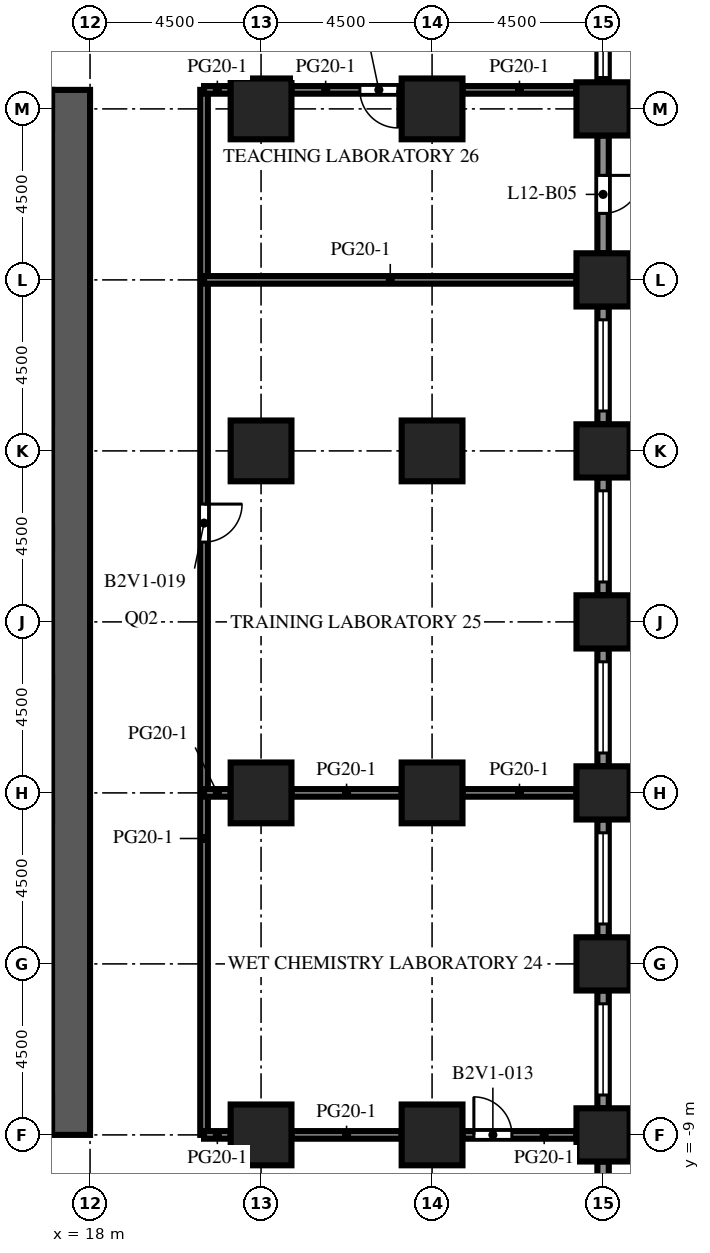
"""IFC4 building model, lengths in metres.
Left out: names, types, materials, properties, quantities, classifications, styles, units other than length and angle.
Written with IfcOpenShell. Run it as: python <this file> out.ifc"""

import sys

from ifc_helpers import new_model, si_unit, direction, frame, frame_2d, origin, origin_2d, place, context, subcontext, project, spatial, rectangle, extrude, element, fill, save


model = new_model("IFC4")
c1 = context("Model", 3, precision=1e-05, world=origin(), true_north=direction((0.0, 1.0)))
c2 = subcontext(c1, "Body", "Model", "MODEL_VIEW")
j1 = project(units=[si_unit("LENGTHUNIT", "METRE"), si_unit("PLANEANGLEUNIT", "RADIAN")], contexts=[c1])
p1 = place(None, origin())
s1 = spatial("IfcSite", under=j1, at=p1, CompositionType="ELEMENT")
p2 = place(p1, origin())
s2 = spatial("IfcBuilding", under=s1, at=p2, CompositionType="ELEMENT")
p3 = place(p2, frame((0.0, 0.0, 54.2)))
s3 = spatial("IfcBuildingStorey", under=s2, at=p3, CompositionType="ELEMENT", Elevation=54.2)
for number, where, z_axis, x_axis in (
    (1, (31.5, -9.0, 0.0), (0.0, 0.0, 1.0), (1.0, 0.0, 0.0)),
    (2, (31.5, -4.5, 0.0), (0.0, 0.0, 1.0), (1.0, 0.0, 0.0)),
    (3, (31.5, 0.0, 0.0), (0.0, 0.0, 1.0), (1.0, 0.0, 0.0)),
    (4, (31.5, 4.5, 0.0), (0.0, 0.0, 1.0), (1.0, 0.0, 0.0)),
    (5, (31.5, 9.0, 0.0), (0.0, 0.0, 1.0), (1.0, 0.0, 0.0)),
    (6, (31.5, 13.5, 0.0), (0.0, 0.0, 1.0), (1.0, 0.0, 0.0)),
    (7, (31.5, 18.0, 0.0), (0.0, 0.0, 1.0), (1.0, 0.0, 0.0)),
):
    element("IfcColumn", number, at=place(p3, frame(where, z_axis=z_axis, x_axis=x_axis)), inside=s3, PredefinedType="COLUMN", context=c2, shape_type="SweptSolid", body=[
        extrude(rectangle(XDim=1.4, YDim=1.4, at=origin_2d()), origin(), (0.0, 0.0, 1.0), 4.1),
    ])
for number, where, z_axis, x_axis in (
    (8, (22.5, -9.0, 0.0), (0.0, 0.0, 1.0), (1.0, 0.0, 0.0)),
    (9, (22.5, 0.0, 0.0), (0.0, 0.0, 1.0), (1.0, 0.0, 0.0)),
    (10, (22.5, 9.0, 0.0), (0.0, 0.0, 1.0), (1.0, 0.0, 0.0)),
    (11, (22.5, 18.0, 0.0), (0.0, 0.0, 1.0), (1.0, 0.0, 0.0)),
    (12, (27.0, -9.0, 0.0), (0.0, 0.0, 1.0), (1.0, 0.0, 0.0)),
    (13, (27.0, 0.0, 0.0), (0.0, 0.0, 1.0), (1.0, 0.0, 0.0)),
    (14, (27.0, 9.0, 0.0), (0.0, 0.0, 1.0), (1.0, 0.0, 0.0)),
    (15, (27.0, 18.0, 0.0), (0.0, 0.0, 1.0), (1.0, 0.0, 0.0)),
):
    element("IfcColumn", number, at=place(p3, frame(where, z_axis=z_axis, x_axis=x_axis)), inside=s3, PredefinedType="COLUMN", context=c2, shape_type="SweptSolid", body=[
        extrude(rectangle(XDim=1.6, YDim=1.6, at=origin_2d()), origin(), (0.0, 0.0, 1.0), 4.1),
    ])
p4 = place(p3, frame((17.5, -9.0, 0.0), z_axis=(0.0, 0.0, 1.0), x_axis=(0.0, 1.0, 0.0)))
e16 = element("IfcWall", 16, at=p4, inside=s3, PredefinedType="SHEAR", context=c2, shape_type="SweptSolid", body=[
    extrude(rectangle(XDim=27.5, YDim=1.0, at=frame_2d((13.75, 0.0))), origin(), (0.0, 0.0, 1.0), 4.1),
])
p5 = place(p4, frame((12.55, 0.0, 0.0)))
e17 = element("IfcOpeningElement", 17, at=p5, cuts=e16, PredefinedType="OPENING", context=c2, shape_type="SweptSolid", body=[
    extrude(rectangle(XDim=2.4, YDim=2.4, at=frame_2d((1.2, 1.2))), frame((0.0, 0.51, 0.0), z_axis=(0.0, -1.0, 0.0), x_axis=(1.0, 0.0, 0.0)), (0.0, 0.0, 1.0), 1.02),
])
p6 = place(p4, frame((6.825, 0.0, 0.0)))
e18 = element("IfcOpeningElement", 18, at=p6, cuts=e16, PredefinedType="OPENING", context=c2, shape_type="SweptSolid", body=[
    extrude(rectangle(XDim=1.2, YDim=2.1, at=frame_2d((0.6, 1.05))), frame((0.0, 0.51, 0.0), z_axis=(0.0, -1.0, 0.0), x_axis=(1.0, 0.0, 0.0)), (0.0, 0.0, 1.0), 1.02),
])
p7 = place(p4, frame((19.475, 0.0, 0.0)))
e19 = element("IfcOpeningElement", 19, at=p7, cuts=e16, PredefinedType="OPENING", context=c2, shape_type="SweptSolid", body=[
    extrude(rectangle(XDim=1.2, YDim=2.1, at=frame_2d((0.6, 1.05))), frame((0.0, 0.51, 0.0), z_axis=(0.0, -1.0, 0.0), x_axis=(1.0, 0.0, 0.0)), (0.0, 0.0, 1.0), 1.02),
])
p8 = place(p3, frame((31.5, -9.7, 0.0), z_axis=(0.0, 0.0, 1.0), x_axis=(0.0, -1.0, 0.0)))
e20 = element("IfcWall", 20, at=p8, inside=s3, PredefinedType="SOLIDWALL", context=c2, shape_type="SweptSolid", body=[
    extrude(rectangle(XDim=3.1, YDim=0.3, at=frame_2d((1.55, 0.0))), origin(), (0.0, 0.0, 1.0), 2.75),
])
p9 = place(p8, frame((0.475, 0.0, 0.8)))
e21 = element("IfcOpeningElement", 21, at=p9, cuts=e20, PredefinedType="OPENING", context=c2, shape_type="SweptSolid", body=[
    extrude(rectangle(XDim=1.2, YDim=1.7, at=frame_2d((0.6, 0.85))), frame((0.0, 0.16, 0.0), z_axis=(0.0, -1.0, 0.0), x_axis=(1.0, 0.0, 0.0)), (0.0, 0.0, 1.0), 0.32),
])
p10 = place(p3, frame((31.5, -5.2, 0.0), z_axis=(0.0, 0.0, 1.0), x_axis=(0.0, -1.0, 0.0)))
e22 = element("IfcWall", 22, at=p10, inside=s3, PredefinedType="SOLIDWALL", context=c2, shape_type="SweptSolid", body=[
    extrude(rectangle(XDim=3.1, YDim=0.3, at=frame_2d((1.55, 0.0))), origin(), (0.0, 0.0, 1.0), 2.75),
])
p11 = place(p10, frame((0.35, 0.0, 0.8)))
e23 = element("IfcOpeningElement", 23, at=p11, cuts=e22, PredefinedType="OPENING", context=c2, shape_type="SweptSolid", body=[
    extrude(rectangle(XDim=2.4, YDim=1.7, at=frame_2d((1.2, 0.85))), frame((0.0, 0.16, 0.0), z_axis=(0.0, -1.0, 0.0), x_axis=(1.0, 0.0, 0.0)), (0.0, 0.0, 1.0), 0.32),
])
p12 = place(p3, frame((31.5, -0.7, 0.0), z_axis=(0.0, 0.0, 1.0), x_axis=(0.0, -1.0, 0.0)))
e24 = element("IfcWall", 24, at=p12, inside=s3, PredefinedType="SOLIDWALL", context=c2, shape_type="SweptSolid", body=[
    extrude(rectangle(XDim=3.1, YDim=0.3, at=frame_2d((1.55, 0.0))), origin(), (0.0, 0.0, 1.0), 2.75),
])
p13 = place(p12, frame((0.35, 0.0, 0.8)))
e25 = element("IfcOpeningElement", 25, at=p13, cuts=e24, PredefinedType="OPENING", context=c2, shape_type="SweptSolid", body=[
    extrude(rectangle(XDim=2.4, YDim=1.7, at=frame_2d((1.2, 0.85))), frame((0.0, 0.16, 0.0), z_axis=(0.0, -1.0, 0.0), x_axis=(1.0, 0.0, 0.0)), (0.0, 0.0, 1.0), 0.32),
])
p14 = place(p3, frame((31.5, 3.8, 0.0), z_axis=(0.0, 0.0, 1.0), x_axis=(0.0, -1.0, 0.0)))
e26 = element("IfcWall", 26, at=p14, inside=s3, PredefinedType="SOLIDWALL", context=c2, shape_type="SweptSolid", body=[
    extrude(rectangle(XDim=3.1, YDim=0.3, at=frame_2d((1.55, 0.0))), origin(), (0.0, 0.0, 1.0), 2.75),
])
p15 = place(p14, frame((0.35, 0.0, 0.8)))
e27 = element("IfcOpeningElement", 27, at=p15, cuts=e26, PredefinedType="OPENING", context=c2, shape_type="SweptSolid", body=[
    extrude(rectangle(XDim=2.4, YDim=1.7, at=frame_2d((1.2, 0.85))), frame((0.0, 0.16, 0.0), z_axis=(0.0, -1.0, 0.0), x_axis=(1.0, 0.0, 0.0)), (0.0, 0.0, 1.0), 0.32),
])
p16 = place(p3, frame((31.5, 8.3, 0.0), z_axis=(0.0, 0.0, 1.0), x_axis=(0.0, -1.0, 0.0)))
e28 = element("IfcWall", 28, at=p16, inside=s3, PredefinedType="SOLIDWALL", context=c2, shape_type="SweptSolid", body=[
    extrude(rectangle(XDim=3.1, YDim=0.3, at=frame_2d((1.55, 0.0))), origin(), (0.0, 0.0, 1.0), 2.75),
])
p17 = place(p16, frame((0.35, 0.0, 0.8)))
e29 = element("IfcOpeningElement", 29, at=p17, cuts=e28, PredefinedType="OPENING", context=c2, shape_type="SweptSolid", body=[
    extrude(rectangle(XDim=2.4, YDim=1.7, at=frame_2d((1.2, 0.85))), frame((0.0, 0.16, 0.0), z_axis=(0.0, -1.0, 0.0), x_axis=(1.0, 0.0, 0.0)), (0.0, 0.0, 1.0), 0.32),
])
p18 = place(p3, frame((31.5, 12.8, 0.0), z_axis=(0.0, 0.0, 1.0), x_axis=(0.0, -1.0, 0.0)))
e30 = element("IfcWall", 30, at=p18, inside=s3, PredefinedType="SOLIDWALL", context=c2, shape_type="SweptSolid", body=[
    extrude(rectangle(XDim=3.1, YDim=0.3, at=frame_2d((1.55, 0.0))), origin(), (0.0, 0.0, 1.0), 2.75),
])
p19 = place(p18, frame((0.35, 0.0, 0.8)))
e31 = element("IfcOpeningElement", 31, at=p19, cuts=e30, PredefinedType="OPENING", context=c2, shape_type="SweptSolid", body=[
    extrude(rectangle(XDim=2.4, YDim=1.7, at=frame_2d((1.2, 0.85))), frame((0.0, 0.16, 0.0), z_axis=(0.0, -1.0, 0.0), x_axis=(1.0, 0.0, 0.0)), (0.0, 0.0, 1.0), 0.32),
])
p20 = place(p3, frame((31.5, 17.3, 0.0), z_axis=(0.0, 0.0, 1.0), x_axis=(0.0, -1.0, 0.0)))
e32 = element("IfcWall", 32, at=p20, inside=s3, PredefinedType="SOLIDWALL", context=c2, shape_type="SweptSolid", body=[
    extrude(rectangle(XDim=3.1, YDim=0.3, at=frame_2d((1.55, 0.0))), origin(), (0.0, 0.0, 1.0), 2.75),
])
p21 = place(p20, frame((1.05, 0.0, 0.0)))
e33 = element("IfcOpeningElement", 33, at=p21, cuts=e32, PredefinedType="OPENING", context=c2, shape_type="SweptSolid", body=[
    extrude(rectangle(XDim=1.0, YDim=2.2, at=frame_2d((0.5, 1.1))), frame((0.0, 0.16, 0.0), z_axis=(0.0, -1.0, 0.0), x_axis=(1.0, 0.0, 0.0)), (0.0, 0.0, 1.0), 0.32),
])
p22 = place(p3, frame((31.5, 21.8, 0.0), z_axis=(0.0, 0.0, 1.0), x_axis=(0.0, -1.0, 0.0)))
e34 = element("IfcWall", 34, at=p22, inside=s3, PredefinedType="SOLIDWALL", context=c2, shape_type="SweptSolid", body=[
    extrude(rectangle(XDim=3.1, YDim=0.3, at=frame_2d((1.55, 0.0))), origin(), (0.0, 0.0, 1.0), 2.75),
])
p23 = place(p22, frame((0.575, 0.0, 0.8)))
e35 = element("IfcOpeningElement", 35, at=p23, cuts=e34, PredefinedType="OPENING", context=c2, shape_type="SweptSolid", body=[
    extrude(rectangle(XDim=2.4, YDim=1.7, at=frame_2d((1.2, 0.85))), frame((0.0, 0.16, 0.0), z_axis=(0.0, -1.0, 0.0), x_axis=(1.0, 0.0, 0.0)), (0.0, 0.0, 1.0), 0.32),
])
p24 = place(p3, frame((21.0, 18.5, 0.0), z_axis=(0.0, 0.0, 1.0), x_axis=(0.0, -1.0, 0.0)))
e36 = element("IfcWall", 36, at=p24, inside=s3, PredefinedType="PARTITIONING", context=c2, shape_type="SweptSolid", body=[
    extrude(rectangle(XDim=27.5, YDim=0.2, at=frame_2d((13.75, 0.0))), origin(), (0.0, 0.0, 1.0), 3.65),
])
p25 = place(p24, frame((10.9, 0.0, 0.0)))
e37 = element("IfcOpeningElement", 37, at=p25, cuts=e36, PredefinedType="OPENING", context=c2, shape_type="SweptSolid", body=[
    extrude(rectangle(XDim=1.0, YDim=2.1, at=frame_2d((0.5, 1.05))), frame((0.0, 0.11, 0.0), z_axis=(0.0, -1.0, 0.0), x_axis=(1.0, 0.0, 0.0)), (0.0, 0.0, 1.0), 0.22),
])
p26 = place(p3, frame((21.0, -9.0, 0.0), z_axis=(0.0, 0.0, 1.0), x_axis=(1.0, 0.0, 0.0)))
e38 = element("IfcWall", 38, at=p26, inside=s3, PredefinedType="PARTITIONING", context=c2, shape_type="SweptSolid", body=[
    extrude(rectangle(XDim=0.7, YDim=0.2, at=frame_2d((0.35, 0.0))), origin(), (0.0, 0.0, 1.0), 3.65),
])
p27 = place(p3, frame((23.3, -9.0, 0.0), z_axis=(0.0, 0.0, 1.0), x_axis=(1.0, 0.0, 0.0)))
e39 = element("IfcWall", 39, at=p27, inside=s3, PredefinedType="PARTITIONING", context=c2, shape_type="SweptSolid", body=[
    extrude(rectangle(XDim=2.9, YDim=0.2, at=frame_2d((1.45, 0.0))), origin(), (0.0, 0.0, 1.0), 3.65),
])
p28 = place(p3, frame((27.8, -9.0, 0.0), z_axis=(0.0, 0.0, 1.0), x_axis=(1.0, 0.0, 0.0)))
e40 = element("IfcWall", 40, at=p28, inside=s3, PredefinedType="PARTITIONING", context=c2, shape_type="SweptSolid", body=[
    extrude(rectangle(XDim=3.0, YDim=0.2, at=frame_2d((1.5, 0.0))), origin(), (0.0, 0.0, 1.0), 3.65),
])
p29 = place(p28, frame((0.3, 0.0, 0.0)))
e41 = element("IfcOpeningElement", 41, at=p29, cuts=e40, PredefinedType="OPENING", context=c2, shape_type="SweptSolid", body=[
    extrude(rectangle(XDim=1.0, YDim=2.1, at=frame_2d((0.5, 1.05))), frame((0.0, 0.11, 0.0), z_axis=(0.0, -1.0, 0.0), x_axis=(1.0, 0.0, 0.0)), (0.0, 0.0, 1.0), 0.22),
])
p30 = place(p3, frame((21.0, 0.0, 0.0), z_axis=(0.0, 0.0, 1.0), x_axis=(1.0, 0.0, 0.0)))
e42 = element("IfcWall", 42, at=p30, inside=s3, PredefinedType="PARTITIONING", context=c2, shape_type="SweptSolid", body=[
    extrude(rectangle(XDim=0.7, YDim=0.2, at=frame_2d((0.35, 0.0))), origin(), (0.0, 0.0, 1.0), 3.65),
])
p31 = place(p3, frame((23.3, 0.0, 0.0), z_axis=(0.0, 0.0, 1.0), x_axis=(1.0, 0.0, 0.0)))
e43 = element("IfcWall", 43, at=p31, inside=s3, PredefinedType="PARTITIONING", context=c2, shape_type="SweptSolid", body=[
    extrude(rectangle(XDim=2.9, YDim=0.2, at=frame_2d((1.45, 0.0))), origin(), (0.0, 0.0, 1.0), 3.65),
])
p32 = place(p3, frame((27.8, 0.0, 0.0), z_axis=(0.0, 0.0, 1.0), x_axis=(1.0, 0.0, 0.0)))
e44 = element("IfcWall", 44, at=p32, inside=s3, PredefinedType="PARTITIONING", context=c2, shape_type="SweptSolid", body=[
    extrude(rectangle(XDim=3.0, YDim=0.2, at=frame_2d((1.5, 0.0))), origin(), (0.0, 0.0, 1.0), 3.65),
])
p33 = place(p3, frame((21.0, 13.5, 0.0), z_axis=(0.0, 0.0, 1.0), x_axis=(1.0, 0.0, 0.0)))
e45 = element("IfcWall", 45, at=p33, inside=s3, PredefinedType="PARTITIONING", context=c2, shape_type="SweptSolid", body=[
    extrude(rectangle(XDim=9.8, YDim=0.2, at=frame_2d((4.9, 0.0))), origin(), (0.0, 0.0, 1.0), 3.65),
])
p34 = place(p3, frame((21.0, 18.5, 0.0), z_axis=(0.0, 0.0, 1.0), x_axis=(1.0, 0.0, 0.0)))
e46 = element("IfcWall", 46, at=p34, inside=s3, PredefinedType="PARTITIONING", context=c2, shape_type="SweptSolid", body=[
    extrude(rectangle(XDim=0.7, YDim=0.2, at=frame_2d((0.35, 0.0))), origin(), (0.0, 0.0, 1.0), 3.65),
])
p35 = place(p3, frame((26.2, 18.5, 0.0), z_axis=(0.0, 0.0, 1.0), x_axis=(-1.0, 0.0, 0.0)))
e47 = element("IfcWall", 47, at=p35, inside=s3, PredefinedType="PARTITIONING", context=c2, shape_type="SweptSolid", body=[
    extrude(rectangle(XDim=2.9, YDim=0.2, at=frame_2d((1.45, 0.0))), origin(), (0.0, 0.0, 1.0), 3.65),
])
p36 = place(p35, frame((0.1, 0.0, 0.0)))
e48 = element("IfcOpeningElement", 48, at=p36, cuts=e47, PredefinedType="OPENING", context=c2, shape_type="SweptSolid", body=[
    extrude(rectangle(XDim=1.0, YDim=2.1, at=frame_2d((0.5, 1.05))), frame((0.0, 0.11, 0.0), z_axis=(0.0, -1.0, 0.0), x_axis=(1.0, 0.0, 0.0)), (0.0, 0.0, 1.0), 0.22),
])
p37 = place(p3, frame((27.8, 18.5, 0.0), z_axis=(0.0, 0.0, 1.0), x_axis=(1.0, 0.0, 0.0)))
e49 = element("IfcWall", 49, at=p37, inside=s3, PredefinedType="PARTITIONING", context=c2, shape_type="SweptSolid", body=[
    extrude(rectangle(XDim=3.0, YDim=0.2, at=frame_2d((1.5, 0.0))), origin(), (0.0, 0.0, 1.0), 3.65),
])
p38 = place(p11, origin())
e50 = element("IfcWindow", 50, at=p38, inside=s3, PartitioningType="SINGLE_PANEL", PredefinedType="WINDOW", context=c2, shape_type="SweptSolid", body=[
    extrude(rectangle(XDim=2.4, YDim=1.7, at=frame_2d((1.2, 0.85))), frame((0.0, 0.03, 0.0), z_axis=(0.0, -1.0, 0.0), x_axis=(1.0, 0.0, 0.0)), (0.0, 0.0, 1.0), 0.06),
])
fill(e23, e50)
p39 = place(p13, origin())
e51 = element("IfcWindow", 51, at=p39, inside=s3, PartitioningType="SINGLE_PANEL", PredefinedType="WINDOW", context=c2, shape_type="SweptSolid", body=[
    extrude(rectangle(XDim=2.4, YDim=1.7, at=frame_2d((1.2, 0.85))), frame((0.0, 0.03, 0.0), z_axis=(0.0, -1.0, 0.0), x_axis=(1.0, 0.0, 0.0)), (0.0, 0.0, 1.0), 0.06),
])
fill(e25, e51)
p40 = place(p15, origin())
e52 = element("IfcWindow", 52, at=p40, inside=s3, PartitioningType="SINGLE_PANEL", PredefinedType="WINDOW", context=c2, shape_type="SweptSolid", body=[
    extrude(rectangle(XDim=2.4, YDim=1.7, at=frame_2d((1.2, 0.85))), frame((0.0, 0.03, 0.0), z_axis=(0.0, -1.0, 0.0), x_axis=(1.0, 0.0, 0.0)), (0.0, 0.0, 1.0), 0.06),
])
fill(e27, e52)
p41 = place(p17, origin())
e53 = element("IfcWindow", 53, at=p41, inside=s3, PartitioningType="SINGLE_PANEL", PredefinedType="WINDOW", context=c2, shape_type="SweptSolid", body=[
    extrude(rectangle(XDim=2.4, YDim=1.7, at=frame_2d((1.2, 0.85))), frame((0.0, 0.03, 0.0), z_axis=(0.0, -1.0, 0.0), x_axis=(1.0, 0.0, 0.0)), (0.0, 0.0, 1.0), 0.06),
])
fill(e29, e53)
p42 = place(p19, origin())
e54 = element("IfcWindow", 54, at=p42, inside=s3, PartitioningType="SINGLE_PANEL", PredefinedType="WINDOW", context=c2, shape_type="SweptSolid", body=[
    extrude(rectangle(XDim=2.4, YDim=1.7, at=frame_2d((1.2, 0.85))), frame((0.0, 0.03, 0.0), z_axis=(0.0, -1.0, 0.0), x_axis=(1.0, 0.0, 0.0)), (0.0, 0.0, 1.0), 0.06),
])
fill(e31, e54)
p43 = place(p21, origin())
e55 = element("IfcDoor", 55, at=p43, inside=s3, OperationType="SINGLE_SWING_LEFT", PredefinedType="DOOR", context=c2, shape_type="SweptSolid", body=[
    extrude(rectangle(XDim=1.0, YDim=2.2, at=frame_2d((0.5, 1.1))), frame((0.0, 0.025, 0.0), z_axis=(0.0, -1.0, 0.0), x_axis=(1.0, 0.0, 0.0)), (0.0, 0.0, 1.0), 0.05),
])
fill(e33, e55)
p44 = place(p23, origin())
e56 = element("IfcWindow", 56, at=p44, inside=s3, PartitioningType="SINGLE_PANEL", PredefinedType="WINDOW", context=c2, shape_type="SweptSolid", body=[
    extrude(rectangle(XDim=2.4, YDim=1.7, at=frame_2d((1.2, 0.85))), frame((0.0, 0.03, 0.0), z_axis=(0.0, -1.0, 0.0), x_axis=(1.0, 0.0, 0.0)), (0.0, 0.0, 1.0), 0.06),
])
fill(e35, e56)
p45 = place(p5, origin())
e57 = element("IfcDoor", 57, at=p45, inside=s3, OperationType="DOUBLE_DOOR_DOUBLE_SWING", PredefinedType="DOOR", context=c2, shape_type="SweptSolid", body=[
    extrude(rectangle(XDim=2.4, YDim=2.4, at=frame_2d((1.2, 1.2))), frame((0.0, 0.025, 0.0), z_axis=(0.0, -1.0, 0.0), x_axis=(1.0, 0.0, 0.0)), (0.0, 0.0, 1.0), 0.05),
])
fill(e17, e57)
p46 = place(p6, frame((1.2, 0.0, 0.0), z_axis=(0.0, 0.0, 1.0), x_axis=(-1.0, 0.0, 0.0)))
e58 = element("IfcDoor", 58, at=p46, inside=s3, OperationType="SINGLE_SWING_LEFT", PredefinedType="DOOR", context=c2, shape_type="SweptSolid", body=[
    extrude(rectangle(XDim=1.2, YDim=2.1, at=frame_2d((0.6, 1.05))), frame((0.0, 0.025, 0.0), z_axis=(0.0, -1.0, 0.0), x_axis=(1.0, 0.0, 0.0)), (0.0, 0.0, 1.0), 0.05),
])
fill(e18, e58)
p47 = place(p7, frame((1.2, 0.0, 0.0), z_axis=(0.0, 0.0, 1.0), x_axis=(-1.0, 0.0, 0.0)))
e59 = element("IfcDoor", 59, at=p47, inside=s3, OperationType="SINGLE_SWING_LEFT", PredefinedType="DOOR", context=c2, shape_type="SweptSolid", body=[
    extrude(rectangle(XDim=1.2, YDim=2.1, at=frame_2d((0.6, 1.05))), frame((0.0, 0.025, 0.0), z_axis=(0.0, -1.0, 0.0), x_axis=(1.0, 0.0, 0.0)), (0.0, 0.0, 1.0), 0.05),
])
fill(e19, e59)
p48 = place(p29, origin())
e60 = element("IfcDoor", 60, at=p48, inside=s3, OperationType="SINGLE_SWING_LEFT", PredefinedType="DOOR", context=c2, shape_type="SweptSolid", body=[
    extrude(rectangle(XDim=1.0, YDim=2.1, at=frame_2d((0.5, 1.05))), frame((0.0, 0.025, 0.0), z_axis=(0.0, -1.0, 0.0), x_axis=(1.0, 0.0, 0.0)), (0.0, 0.0, 1.0), 0.05),
])
fill(e41, e60)
p49 = place(p36, origin())
e61 = element("IfcDoor", 61, at=p49, inside=s3, OperationType="SINGLE_SWING_LEFT", PredefinedType="DOOR", context=c2, shape_type="SweptSolid", body=[
    extrude(rectangle(XDim=1.0, YDim=2.1, at=frame_2d((0.5, 1.05))), frame((0.0, 0.025, 0.0), z_axis=(0.0, -1.0, 0.0), x_axis=(1.0, 0.0, 0.0)), (0.0, 0.0, 1.0), 0.05),
])
fill(e48, e61)
p50 = place(p25, origin())
e62 = element("IfcDoor", 62, at=p50, inside=s3, OperationType="SINGLE_SWING_LEFT", PredefinedType="DOOR", context=c2, shape_type="SweptSolid", body=[
    extrude(rectangle(XDim=1.0, YDim=2.1, at=frame_2d((0.5, 1.05))), frame((0.0, 0.025, 0.0), z_axis=(0.0, -1.0, 0.0), x_axis=(1.0, 0.0, 0.0)), (0.0, 0.0, 1.0), 0.05),
])
fill(e37, e62)
save(model, sys.argv[1])
